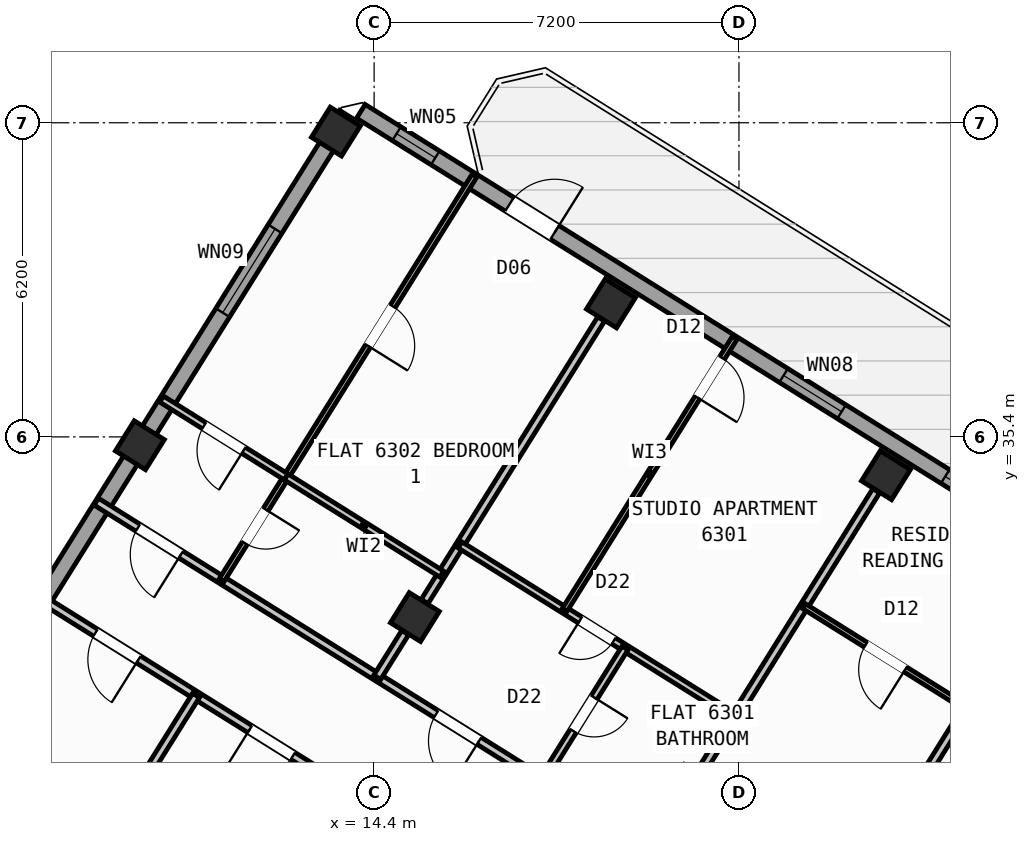
"""IFC4 building model, lengths in metres.
Left out: names, types, materials, properties, quantities, classifications, styles, units other than length and angle.
Written with IfcOpenShell. Run it as: python <this file> out.ifc"""

import sys

from ifc_helpers import new_model, si_unit, direction, frame, frame_2d, origin, origin_2d, place, context, subcontext, project, spatial, rectangle, hollow_rectangle, extrude, source, transform, mapped, element, fill, save


model = new_model("IFC4")
c1 = context("Model", 3, precision=1e-05, world=origin(), true_north=direction((0.0, 1.0)))
c2 = subcontext(c1, "Body", "Model", "MODEL_VIEW")
j1 = project(units=[si_unit("LENGTHUNIT", "METRE"), si_unit("PLANEANGLEUNIT", "RADIAN")], contexts=[c1])
p1 = place(None, origin())
s1 = spatial("IfcSite", under=j1, at=p1, CompositionType="ELEMENT")
p2 = place(p1, origin())
s2 = spatial("IfcBuilding", under=s1, at=p2, CompositionType="ELEMENT")
p3 = place(p2, frame((0.0, 0.0, 251.1)))
s3 = spatial("IfcBuildingStorey", under=s2, at=p3, CompositionType="ELEMENT", Elevation=251.1)
m1 = source(origin(), c2, "Body", "SweptSolid", [
    extrude(hollow_rectangle(XDim=0.7, YDim=0.7, WallThickness=0.028, at=origin_2d()), origin(), (0.0, 0.0, 1.0), 3.6),
])
for number, where, z_axis, x_axis in (
    (1, (24.5, 34.643, 0.0), (0.0, 0.0, 1.0), (-0.848, 0.53, 0.0)),
    (2, (19.073, 38.034, 0.0), (0.0, 0.0, 1.0), (-0.848, 0.53, 0.0)),
    (3, (15.205, 31.844, 0.0), (0.0, 0.0, 1.0), (-0.848, 0.53, 0.0)),
    (4, (13.646, 41.426, 0.0), (0.0, 0.0, 1.0), (-0.848, 0.53, 0.0)),
    (5, (9.777, 35.235, 0.0), (0.0, 0.0, 1.0), (-0.848, 0.53, 0.0)),
):
    element("IfcColumn", number, at=place(p3, frame(where, z_axis=z_axis, x_axis=x_axis)), inside=s3, PredefinedType="COLUMN", context=c2, shape_type="MappedRepresentation", body=[
        mapped(m1, transform((0.0, 0.0, 0.0), scale=1.0)),
    ])
p4 = place(p3, frame((2.415, 23.452, 0.0), z_axis=(0.0, 0.0, 1.0), x_axis=(0.52991049553, 0.848053575387, 0.0)))
e6 = element("IfcWall", 6, at=p4, inside=s3, PredefinedType="STANDARD", context=c2, shape_type="SweptSolid", body=[
    extrude(rectangle(XDim=21.587, YDim=0.32, at=frame_2d((10.794, 0.0))), origin(), (0.0, 0.0, 1.0), 2.845),
])
p5 = place(p4, frame((3.119, 0.0, 0.9)))
e7 = element("IfcOpeningElement", 7, at=p5, cuts=e6, PredefinedType="OPENING", context=c2, shape_type="SweptSolid", body=[
    extrude(rectangle(XDim=1.65, YDim=1.45, at=frame_2d((0.825, 0.725))), frame((0.0, 0.17, 0.0), z_axis=(0.0, -1.0, 0.0), x_axis=(1.0, 0.0, 0.0)), (0.0, 0.0, 1.0), 0.34),
])
p6 = place(p4, frame((7.854, 0.0, 0.9)))
e8 = element("IfcOpeningElement", 8, at=p6, cuts=e6, PredefinedType="OPENING", context=c2, shape_type="SweptSolid", body=[
    extrude(rectangle(XDim=1.35, YDim=1.45, at=frame_2d((0.675, 0.725))), frame((0.0, 0.17, 0.0), z_axis=(0.0, -1.0, 0.0), x_axis=(1.0, 0.0, 0.0)), (0.0, 0.0, 1.0), 0.34),
])
p7 = place(p4, frame((16.979, 0.0, 0.95)))
e9 = element("IfcOpeningElement", 9, at=p7, cuts=e6, PredefinedType="OPENING", context=c2, shape_type="SweptSolid", body=[
    extrude(rectangle(XDim=1.95, YDim=1.35, at=frame_2d((0.975, 0.675))), frame((0.0, 0.17, 0.0), z_axis=(0.0, -1.0, 0.0), x_axis=(1.0, 0.0, 0.0)), (0.0, 0.0, 1.0), 0.34),
])
p8 = place(p3, frame((14.138, 41.825, 0.0), z_axis=(0.0, 0.0, 1.0), x_axis=(0.848046498049, -0.529921821731, 0.0)))
e10 = element("IfcWall", 10, at=p8, inside=s3, PredefinedType="STANDARD", context=c2, shape_type="SweptSolid", body=[
    extrude(rectangle(XDim=31.588, YDim=0.32, at=frame_2d((15.794, 0.0))), origin(), (0.0, 0.0, 1.0), 3.32),
])
p9 = place(p8, frame((3.46, 0.0, 0.0)))
e11 = element("IfcOpeningElement", 11, at=p9, cuts=e10, PredefinedType="OPENING", context=c2, shape_type="SweptSolid", body=[
    extrude(rectangle(XDim=1.05, YDim=2.15, at=frame_2d((0.525, 1.075))), frame((0.0, 0.17, 0.0), z_axis=(0.0, -1.0, 0.0), x_axis=(1.0, 0.0, 0.0)), (0.0, 0.0, 1.0), 0.34),
])
p10 = place(p8, frame((0.831, 0.0, 1.0)))
e12 = element("IfcOpeningElement", 12, at=p10, cuts=e10, PredefinedType="OPENING", context=c2, shape_type="SweptSolid", body=[
    extrude(rectangle(XDim=0.9, YDim=1.25, at=frame_2d((0.45, 0.625))), frame((0.0, 0.17, 0.0), z_axis=(0.0, -1.0, 0.0), x_axis=(1.0, 0.0, 0.0)), (0.0, 0.0, 1.0), 0.34),
])
p11 = place(p8, frame((9.837, 0.0, 0.9)))
e13 = element("IfcOpeningElement", 13, at=p11, cuts=e10, PredefinedType="OPENING", context=c2, shape_type="SweptSolid", body=[
    extrude(rectangle(XDim=1.35, YDim=1.45, at=frame_2d((0.675, 0.725))), frame((0.0, 0.17, 0.0), z_axis=(0.0, -1.0, 0.0), x_axis=(1.0, 0.0, 0.0)), (0.0, 0.0, 1.0), 0.34),
])
p12 = place(p8, frame((13.599, 0.0, 0.95)))
e14 = element("IfcOpeningElement", 14, at=p12, cuts=e10, PredefinedType="OPENING", context=c2, shape_type="SweptSolid", body=[
    extrude(rectangle(XDim=1.95, YDim=1.35, at=frame_2d((0.975, 0.675))), frame((0.0, 0.17, 0.0), z_axis=(0.0, -1.0, 0.0), x_axis=(1.0, 0.0, 0.0)), (0.0, 0.0, 1.0), 0.34),
])
p13 = place(p8, frame((17.154, 0.0, 1.0)))
e15 = element("IfcOpeningElement", 15, at=p13, cuts=e10, PredefinedType="OPENING", context=c2, shape_type="SweptSolid", body=[
    extrude(rectangle(XDim=0.9, YDim=1.25, at=frame_2d((0.45, 0.625))), frame((0.0, 0.17, 0.0), z_axis=(0.0, -1.0, 0.0), x_axis=(1.0, 0.0, 0.0)), (0.0, 0.0, 1.0), 0.34),
])
p14 = place(p8, frame((21.651, 0.0, 0.9)))
e16 = element("IfcOpeningElement", 16, at=p14, cuts=e10, PredefinedType="OPENING", context=c2, shape_type="SweptSolid", body=[
    extrude(rectangle(XDim=1.65, YDim=1.45, at=frame_2d((0.825, 0.725))), frame((0.0, 0.17, 0.0), z_axis=(0.0, -1.0, 0.0), x_axis=(1.0, 0.0, 0.0)), (0.0, 0.0, 1.0), 0.34),
])
p15 = place(p8, frame((27.215, 0.0, 0.9)))
e17 = element("IfcOpeningElement", 17, at=p15, cuts=e10, PredefinedType="OPENING", context=c2, shape_type="SweptSolid", body=[
    extrude(rectangle(XDim=1.65, YDim=1.45, at=frame_2d((0.825, 0.725))), frame((0.0, 0.17, 0.0), z_axis=(0.0, -1.0, 0.0), x_axis=(1.0, 0.0, 0.0)), (0.0, 0.0, 1.0), 0.34),
])
p16 = place(p3, frame((27.953, 33.016, 0.0), z_axis=(0.0, 0.0, 1.0), x_axis=(-0.529903001606, -0.848058257957, 0.0)))
e18 = element("IfcWall", 18, at=p16, inside=s3, PredefinedType="PARTITIONING", context=c2, shape_type="SweptSolid", body=[
    extrude(rectangle(XDim=9.15, YDim=0.16, at=frame_2d((4.575, 0.0))), origin(), (0.0, 0.0, 1.0), 3.31),
])
p17 = place(p3, frame((23.104, 25.256, 0.0), z_axis=(0.0, 0.0, 1.0), x_axis=(-0.848041752158, 0.529929416617, 0.0)))
e19 = element("IfcWall", 19, at=p17, inside=s3, PredefinedType="PARTITIONING", context=c2, shape_type="SweptSolid", body=[
    extrude(rectangle(XDim=16.73, YDim=0.16, at=frame_2d((8.365, 0.0))), origin(), (0.0, 0.0, 1.0), 3.31),
])
p18 = place(p17, frame((1.395, 0.0, 0.0)))
e20 = element("IfcOpeningElement", 20, at=p18, cuts=e19, PredefinedType="OPENING", context=c2, shape_type="SweptSolid", body=[
    extrude(rectangle(XDim=1.0, YDim=2.1, at=frame_2d((0.5, 1.05))), frame((0.0, 0.09, 0.0), z_axis=(0.0, -1.0, 0.0), x_axis=(1.0, 0.0, 0.0)), (0.0, 0.0, 1.0), 0.18),
])
p19 = place(p17, frame((7.82, 0.0, 0.0)))
e21 = element("IfcOpeningElement", 21, at=p19, cuts=e19, PredefinedType="OPENING", context=c2, shape_type="SweptSolid", body=[
    extrude(rectangle(XDim=1.0, YDim=2.1, at=frame_2d((0.5, 1.05))), frame((0.0, 0.09, 0.0), z_axis=(0.0, -1.0, 0.0), x_axis=(1.0, 0.0, 0.0)), (0.0, 0.0, 1.0), 0.18),
])
p20 = place(p17, frame((14.76, 0.0, 0.0)))
e22 = element("IfcOpeningElement", 22, at=p20, cuts=e19, PredefinedType="OPENING", context=c2, shape_type="SweptSolid", body=[
    extrude(rectangle(XDim=1.0, YDim=2.1, at=frame_2d((0.5, 1.05))), frame((0.0, 0.09, 0.0), z_axis=(0.0, -1.0, 0.0), x_axis=(1.0, 0.0, 0.0)), (0.0, 0.0, 1.0), 0.18),
])
p21 = place(p3, frame((21.938, 23.391, 0.0), z_axis=(0.0, 0.0, 1.0), x_axis=(-0.848045850158, 0.529922858565, 0.0)))
e23 = element("IfcWall", 23, at=p21, inside=s3, PredefinedType="PARTITIONING", context=c2, shape_type="SweptSolid", body=[
    extrude(rectangle(XDim=16.73, YDim=0.16, at=frame_2d((8.365, 0.0))), origin(), (0.0, 0.0, 1.0), 3.31),
])
p22 = place(p21, frame((0.92, 0.0, 0.0)))
e24 = element("IfcOpeningElement", 24, at=p22, cuts=e23, PredefinedType="OPENING", context=c2, shape_type="SweptSolid", body=[
    extrude(rectangle(XDim=1.0, YDim=2.1, at=frame_2d((0.5, 1.05))), frame((0.0, 0.09, 0.0), z_axis=(0.0, -1.0, 0.0), x_axis=(1.0, 0.0, 0.0)), (0.0, 0.0, 1.0), 0.18),
])
p23 = place(p21, frame((3.928, 0.0, 0.0)))
e25 = element("IfcOpeningElement", 25, at=p23, cuts=e23, PredefinedType="OPENING", context=c2, shape_type="SweptSolid", body=[
    extrude(rectangle(XDim=1.0, YDim=2.1, at=frame_2d((0.5, 1.05))), frame((0.0, 0.09, 0.0), z_axis=(0.0, -1.0, 0.0), x_axis=(1.0, 0.0, 0.0)), (0.0, 0.0, 1.0), 0.18),
])
p24 = place(p21, frame((7.271, 0.0, 0.0)))
e26 = element("IfcOpeningElement", 26, at=p24, cuts=e23, PredefinedType="OPENING", context=c2, shape_type="SweptSolid", body=[
    extrude(rectangle(XDim=1.0, YDim=2.1, at=frame_2d((0.5, 1.05))), frame((0.0, 0.09, 0.0), z_axis=(0.0, -1.0, 0.0), x_axis=(1.0, 0.0, 0.0)), (0.0, 0.0, 1.0), 0.18),
])
p25 = place(p21, frame((10.78, 0.0, 0.0)))
e27 = element("IfcOpeningElement", 27, at=p25, cuts=e23, PredefinedType="OPENING", context=c2, shape_type="SweptSolid", body=[
    extrude(rectangle(XDim=1.0, YDim=2.1, at=frame_2d((0.5, 1.05))), frame((0.0, 0.09, 0.0), z_axis=(0.0, -1.0, 0.0), x_axis=(1.0, 0.0, 0.0)), (0.0, 0.0, 1.0), 0.18),
])
p26 = place(p21, frame((14.372, 0.0, 0.0)))
e28 = element("IfcOpeningElement", 28, at=p26, cuts=e23, PredefinedType="OPENING", context=c2, shape_type="SweptSolid", body=[
    extrude(rectangle(XDim=1.0, YDim=2.1, at=frame_2d((0.5, 1.05))), frame((0.0, 0.09, 0.0), z_axis=(0.0, -1.0, 0.0), x_axis=(1.0, 0.0, 0.0)), (0.0, 0.0, 1.0), 0.18),
])
p27 = place(p3, frame((10.885, 30.298, 0.0), z_axis=(0.0, 0.0, 1.0), x_axis=(-0.529924725692, -0.848044683434, 0.0)))
e29 = element("IfcWall", 29, at=p27, inside=s3, PredefinedType="PARTITIONING", context=c2, shape_type="SweptSolid", body=[
    extrude(rectangle(XDim=10.35, YDim=0.16, at=frame_2d((5.175, 0.0))), origin(), (0.0, 0.0, 1.0), 3.31),
])
p28 = place(p3, frame((24.309, 34.336, 0.0), z_axis=(0.0, 0.0, 1.0), x_axis=(-0.529895484599, -0.848062954858, 0.0)))
e30 = element("IfcWall", 30, at=p28, inside=s3, PredefinedType="PARTITIONING", context=c2, shape_type="SweptSolid", body=[
    extrude(rectangle(XDim=6.576, YDim=0.16, at=frame_2d((3.288, 0.0))), origin(), (0.0, 0.0, 1.0), 2.845),
])
p29 = place(p3, frame((26.099, 30.05, 0.0), z_axis=(0.0, 0.0, 1.0), x_axis=(-0.84803087207, 0.529946827537, 0.0)))
e31 = element("IfcWall", 31, at=p29, inside=s3, PredefinedType="PARTITIONING", context=c2, shape_type="SweptSolid", body=[
    extrude(rectangle(XDim=3.79, YDim=0.11, at=frame_2d((1.895, 0.0))), origin(), (0.0, 0.0, 1.0), 3.31),
])
p30 = place(p29, frame((1.435, 0.0, 0.0)))
e32 = element("IfcOpeningElement", 32, at=p30, cuts=e31, PredefinedType="OPENING", context=c2, shape_type="SweptSolid", body=[
    extrude(rectangle(XDim=0.92, YDim=2.08, at=frame_2d((0.46, 1.04))), frame((0.0, 0.065, 0.0), z_axis=(0.0, -1.0, 0.0), x_axis=(1.0, 0.0, 0.0)), (0.0, 0.0, 1.0), 0.13),
])
p31 = place(p3, frame((18.881, 37.727, 0.0), z_axis=(0.0, 0.0, 1.0), x_axis=(-0.529938869374, -0.84803584519, 0.0)))
e33 = element("IfcWall", 33, at=p31, inside=s3, PredefinedType="PARTITIONING", context=c2, shape_type="SweptSolid", body=[
    extrude(rectangle(XDim=6.576, YDim=0.16, at=frame_2d((3.288, 0.0))), origin(), (0.0, 0.0, 1.0), 2.845),
])
p32 = place(p3, frame((15.013, 31.537, 0.0), z_axis=(0.0, 0.0, 1.0), x_axis=(-0.529872092657, -0.848077570405, 0.0)))
e34 = element("IfcWall", 34, at=p32, inside=s3, PredefinedType="PARTITIONING", context=c2, shape_type="SweptSolid", body=[
    extrude(rectangle(XDim=1.038, YDim=0.16, at=frame_2d((0.519, 0.0))), origin(), (0.0, 0.0, 1.0), 2.845),
])
p33 = place(p3, frame((21.522, 29.877, 0.0), z_axis=(0.0, 0.0, 1.0), x_axis=(-0.848039019877, 0.529933789039, 0.0)))
e35 = element("IfcWall", 35, at=p33, inside=s3, PredefinedType="PLUMBINGWALL", context=c2, shape_type="SweptSolid", body=[
    extrude(rectangle(XDim=6.4, YDim=0.14, at=frame_2d((3.2, 0.0))), origin(), (0.0, 0.0, 1.0), 3.31),
])
p34 = place(p33, frame((2.824, 0.0, 0.0)))
e36 = element("IfcOpeningElement", 36, at=p34, cuts=e35, PredefinedType="OPENING", context=c2, shape_type="SweptSolid", body=[
    extrude(rectangle(XDim=0.78, YDim=2.05, at=frame_2d((0.39, 1.025))), frame((0.0, 0.08, 0.0), z_axis=(0.0, -1.0, 0.0), x_axis=(1.0, 0.0, 0.0)), (0.0, 0.0, 1.0), 0.16),
])
p35 = place(p3, frame((19.351, 31.233, 0.0), z_axis=(0.0, 0.0, 1.0), x_axis=(-0.52989206052, -0.848065094316, 0.0)))
e37 = element("IfcWall", 37, at=p35, inside=s3, PredefinedType="PLUMBINGWALL", context=c2, shape_type="SweptSolid", body=[
    extrude(rectangle(XDim=3.08, YDim=0.14, at=frame_2d((1.54, 0.0))), origin(), (0.0, 0.0, 1.0), 3.31),
])
p36 = place(p35, frame((1.15, 0.0, 0.0)))
e38 = element("IfcOpeningElement", 38, at=p36, cuts=e37, PredefinedType="OPENING", context=c2, shape_type="SweptSolid", body=[
    extrude(rectangle(XDim=0.78, YDim=2.05, at=frame_2d((0.39, 1.025))), frame((0.0, 0.08, 0.0), z_axis=(0.0, -1.0, 0.0), x_axis=(1.0, 0.0, 0.0)), (0.0, 0.0, 1.0), 0.16),
])
p37 = place(p3, frame((21.517, 37.356, 0.0), z_axis=(0.0, 0.0, 1.0), x_axis=(-0.529905479715, -0.848056709524, 0.0)))
e39 = element("IfcWall", 39, at=p37, inside=s3, PredefinedType="PARTITIONING", context=c2, shape_type="SweptSolid", body=[
    extrude(rectangle(XDim=6.34, YDim=0.11, at=frame_2d((3.17, 0.0))), origin(), (0.0, 0.0, 1.0), 3.31),
])
p38 = place(p37, frame((0.47, 0.0, 0.0)))
e40 = element("IfcOpeningElement", 40, at=p38, cuts=e39, PredefinedType="OPENING", context=c2, shape_type="SweptSolid", body=[
    extrude(rectangle(XDim=0.92, YDim=2.08, at=frame_2d((0.46, 1.04))), frame((0.0, 0.065, 0.0), z_axis=(0.0, -1.0, 0.0), x_axis=(1.0, 0.0, 0.0)), (0.0, 0.0, 1.0), 0.13),
])
p39 = place(p3, frame((16.385, 40.563, 0.0), z_axis=(0.0, 0.0, 1.0), x_axis=(-0.529931378574, -0.848040526156, 0.0)))
e41 = element("IfcWall", 41, at=p39, inside=s3, PredefinedType="PARTITIONING", context=c2, shape_type="SweptSolid", body=[
    extrude(rectangle(XDim=9.42, YDim=0.11, at=frame_2d((4.71, 0.0))), origin(), (0.0, 0.0, 1.0), 3.31),
])
p40 = place(p39, frame((7.78, 0.0, 0.0)))
e42 = element("IfcOpeningElement", 42, at=p40, cuts=e41, PredefinedType="OPENING", context=c2, shape_type="SweptSolid", body=[
    extrude(rectangle(XDim=0.78, YDim=2.05, at=frame_2d((0.39, 1.025))), frame((0.0, 0.065, 0.0), z_axis=(0.0, -1.0, 0.0), x_axis=(1.0, 0.0, 0.0)), (0.0, 0.0, 1.0), 0.13),
])
p41 = place(p39, frame((3.05, 0.0, 0.0)))
e43 = element("IfcOpeningElement", 43, at=p41, cuts=e41, PredefinedType="OPENING", context=c2, shape_type="SweptSolid", body=[
    extrude(rectangle(XDim=0.92, YDim=2.08, at=frame_2d((0.46, 1.04))), frame((0.0, 0.065, 0.0), z_axis=(0.0, -1.0, 0.0), x_axis=(1.0, 0.0, 0.0)), (0.0, 0.0, 1.0), 0.13),
])
p42 = place(p3, frame((12.665, 34.61, 0.0), z_axis=(0.0, 0.0, 1.0), x_axis=(-0.848045593671, 0.529923269025, 0.0)))
e44 = element("IfcWall", 44, at=p42, inside=s3, PredefinedType="PLUMBINGWALL", context=c2, shape_type="SweptSolid", body=[
    extrude(rectangle(XDim=2.9, YDim=0.14, at=frame_2d((1.45, 0.0))), origin(), (0.0, 0.0, 1.0), 3.31),
])
p43 = place(p42, frame((0.99, 0.0, 0.0)))
e45 = element("IfcOpeningElement", 45, at=p43, cuts=e44, PredefinedType="OPENING", context=c2, shape_type="SweptSolid", body=[
    extrude(rectangle(XDim=0.92, YDim=2.08, at=frame_2d((0.46, 1.04))), frame((0.0, 0.08, 0.0), z_axis=(0.0, -1.0, 0.0), x_axis=(1.0, 0.0, 0.0)), (0.0, 0.0, 1.0), 0.16),
])
p44 = place(p3, frame((15.734, 32.692, 0.0), z_axis=(0.0, 0.0, 1.0), x_axis=(-0.848051346257, 0.52991406295, 0.0)))
e46 = element("IfcWall", 46, at=p44, inside=s3, PredefinedType="PLUMBINGWALL", context=c2, shape_type="SweptSolid", body=[
    extrude(rectangle(XDim=3.62, YDim=0.14, at=frame_2d((1.81, 0.0))), origin(), (0.0, 0.0, 1.0), 3.31),
])
m2 = source(origin(), c2, "Body", "SweptSolid", [
    extrude(rectangle(XDim=1.05, YDim=2.15, at=frame_2d((0.525, 1.075))), frame((0.0, 0.025, 0.0), z_axis=(0.0, -1.0, 0.0), x_axis=(1.0, 0.0, 0.0)), (0.0, 0.0, 1.0), 0.05),
])
p45 = place(p9, origin())
e47 = element("IfcDoor", 47, at=p45, inside=s3, OperationType="SINGLE_SWING_RIGHT", PredefinedType="DOOR", context=c2, shape_type="MappedRepresentation", body=[
    mapped(m2, transform((0.0, 0.0, 0.0), scale=1.0)),
])
fill(e11, e47)
m3 = source(origin(), c2, "Body", "SweptSolid", [
    extrude(rectangle(XDim=1.95, YDim=1.35, at=frame_2d((0.975, 0.675))), frame((0.0, 0.03, 0.0), z_axis=(0.0, -1.0, 0.0), x_axis=(1.0, 0.0, 0.0)), (0.0, 0.0, 1.0), 0.06),
])
p46 = place(p7, origin())
e48 = element("IfcWindow", 48, at=p46, inside=s3, PartitioningType="SINGLE_PANEL", PredefinedType="WINDOW", context=c2, shape_type="MappedRepresentation", body=[
    mapped(m3, transform((0.0, 0.0, 0.0), scale=1.0)),
])
fill(e9, e48)
m4 = source(origin(), c2, "Body", "SweptSolid", [
    extrude(rectangle(XDim=0.9, YDim=1.25, at=frame_2d((0.45, 0.625))), frame((0.0, 0.03, 0.0), z_axis=(0.0, -1.0, 0.0), x_axis=(1.0, 0.0, 0.0)), (0.0, 0.0, 1.0), 0.06),
])
p47 = place(p10, origin())
e49 = element("IfcWindow", 49, at=p47, inside=s3, PartitioningType="SINGLE_PANEL", PredefinedType="WINDOW", context=c2, shape_type="MappedRepresentation", body=[
    mapped(m4, transform((0.0, 0.0, 0.0), scale=1.0)),
])
fill(e12, e49)
m5 = source(origin(), c2, "Body", "SweptSolid", [
    extrude(rectangle(XDim=1.35, YDim=1.45, at=frame_2d((0.675, 0.725))), frame((0.0, 0.03, 0.0), z_axis=(0.0, -1.0, 0.0), x_axis=(1.0, 0.0, 0.0)), (0.0, 0.0, 1.0), 0.06),
])
p48 = place(p11, origin())
e50 = element("IfcWindow", 50, at=p48, inside=s3, PartitioningType="SINGLE_PANEL", PredefinedType="WINDOW", context=c2, shape_type="MappedRepresentation", body=[
    mapped(m5, transform((0.0, 0.0, 0.0), scale=1.0)),
])
fill(e13, e50)
p49 = place(p12, origin())
e51 = element("IfcWindow", 51, at=p49, inside=s3, PartitioningType="SINGLE_PANEL", PredefinedType="WINDOW", context=c2, shape_type="MappedRepresentation", body=[
    mapped(m3, transform((0.0, 0.0, 0.0), scale=1.0)),
])
fill(e14, e51)
m6 = source(origin(), c2, "Body", "SweptSolid", [
    extrude(rectangle(XDim=1.0, YDim=2.1, at=frame_2d((0.5, 1.05))), frame((0.0, 0.025, 0.0), z_axis=(0.0, -1.0, 0.0), x_axis=(1.0, 0.0, 0.0)), (0.0, 0.0, 1.0), 0.05),
])
p50 = place(p25, origin())
e52 = element("IfcDoor", 52, at=p50, inside=s3, OperationType="SINGLE_SWING_RIGHT", PredefinedType="DOOR", context=c2, shape_type="MappedRepresentation", body=[
    mapped(m6, transform((0.0, 0.0, 0.0), scale=1.0)),
])
fill(e27, e52)
p51 = place(p26, origin())
e53 = element("IfcDoor", 53, at=p51, inside=s3, OperationType="SINGLE_SWING_LEFT", PredefinedType="DOOR", context=c2, shape_type="MappedRepresentation", body=[
    mapped(m6, transform((0.0, 0.0, 0.0), scale=1.0)),
])
fill(e28, e53)
m7 = source(origin(), c2, "Body", "SweptSolid", [
    extrude(rectangle(XDim=0.92, YDim=2.08, at=frame_2d((0.46, 1.04))), frame((0.0, 0.025, 0.0), z_axis=(0.0, -1.0, 0.0), x_axis=(1.0, 0.0, 0.0)), (0.0, 0.0, 1.0), 0.05),
])
p52 = place(p30, origin())
e54 = element("IfcDoor", 54, at=p52, inside=s3, OperationType="SINGLE_SWING_LEFT", PredefinedType="DOOR", context=c2, shape_type="MappedRepresentation", body=[
    mapped(m7, transform((0.0, 0.0, 0.0), scale=1.0)),
])
fill(e32, e54)
p53 = place(p38, origin())
e55 = element("IfcDoor", 55, at=p53, inside=s3, OperationType="SINGLE_SWING_RIGHT", PredefinedType="DOOR", context=c2, shape_type="MappedRepresentation", body=[
    mapped(m7, transform((0.0, 0.0, 0.0), scale=1.0)),
])
fill(e40, e55)
p54 = place(p19, origin())
e56 = element("IfcDoor", 56, at=p54, inside=s3, OperationType="SINGLE_SWING_LEFT", PredefinedType="DOOR", context=c2, shape_type="MappedRepresentation", body=[
    mapped(m6, transform((0.0, 0.0, 0.0), scale=1.0)),
])
fill(e21, e56)
m8 = source(origin(), c2, "Body", "SweptSolid", [
    extrude(rectangle(XDim=0.78, YDim=2.05, at=frame_2d((0.39, 1.025))), frame((0.0, 0.025, 0.0), z_axis=(0.0, -1.0, 0.0), x_axis=(1.0, 0.0, 0.0)), (0.0, 0.0, 1.0), 0.05),
])
p55 = place(p34, origin())
e57 = element("IfcDoor", 57, at=p55, inside=s3, OperationType="SINGLE_SWING_RIGHT", PredefinedType="DOOR", context=c2, shape_type="MappedRepresentation", body=[
    mapped(m8, transform((0.0, 0.0, 0.0), scale=1.0)),
])
fill(e36, e57)
p56 = place(p36, origin())
e58 = element("IfcDoor", 58, at=p56, inside=s3, OperationType="SINGLE_SWING_LEFT", PredefinedType="DOOR", context=c2, shape_type="MappedRepresentation", body=[
    mapped(m8, transform((0.0, 0.0, 0.0), scale=1.0)),
])
fill(e38, e58)
p57 = place(p20, origin())
e59 = element("IfcDoor", 59, at=p57, inside=s3, OperationType="SINGLE_SWING_LEFT", PredefinedType="DOOR", context=c2, shape_type="MappedRepresentation", body=[
    mapped(m6, transform((0.0, 0.0, 0.0), scale=1.0)),
])
fill(e22, e59)
p58 = place(p43, origin())
e60 = element("IfcDoor", 60, at=p58, inside=s3, OperationType="SINGLE_SWING_LEFT", PredefinedType="DOOR", context=c2, shape_type="MappedRepresentation", body=[
    mapped(m7, transform((0.0, 0.0, 0.0), scale=1.0)),
])
fill(e45, e60)
p59 = place(p40, origin())
e61 = element("IfcDoor", 61, at=p59, inside=s3, OperationType="SINGLE_SWING_LEFT", PredefinedType="DOOR", context=c2, shape_type="MappedRepresentation", body=[
    mapped(m8, transform((0.0, 0.0, 0.0), scale=1.0)),
])
fill(e42, e61)
p60 = place(p41, origin())
e62 = element("IfcDoor", 62, at=p60, inside=s3, OperationType="SINGLE_SWING_RIGHT", PredefinedType="DOOR", context=c2, shape_type="MappedRepresentation", body=[
    mapped(m7, transform((0.0, 0.0, 0.0), scale=1.0)),
])
fill(e43, e62)
save(model, sys.argv[1])
